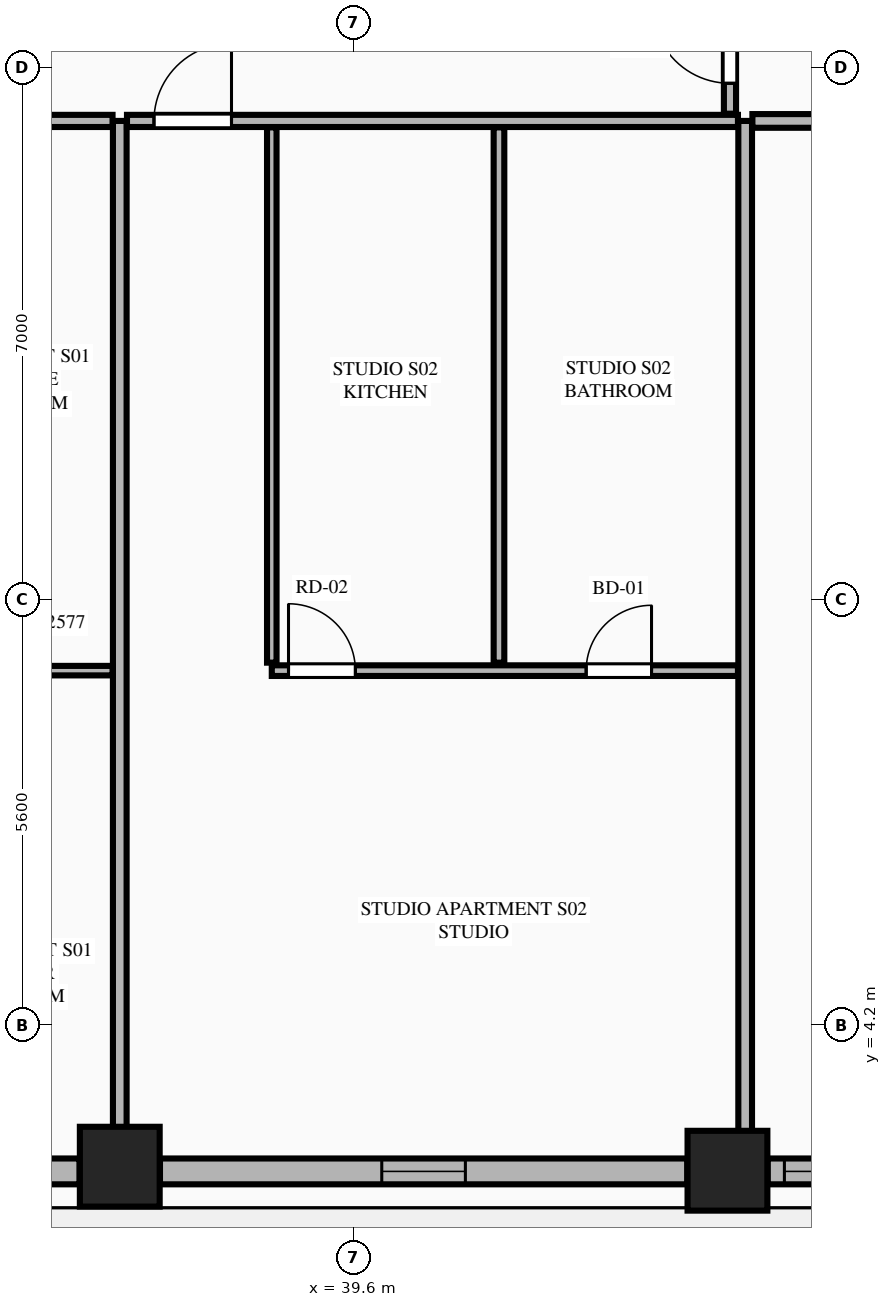
"""IFC4 building model, lengths in metres.
Left out: names, types, materials, properties, quantities, classifications, styles, units other than length and angle.
Written with IfcOpenShell. Run it as: python <this file> out.ifc"""

import sys

from ifc_helpers import new_model, si_unit, direction, frame, frame_2d, origin, origin_2d, place, context, subcontext, project, spatial, rectangle, extrude, element, fill, save


model = new_model("IFC4")
c1 = context("Model", 3, precision=1e-05, world=origin(), true_north=direction((0.0, 1.0)))
c2 = subcontext(c1, "Body", "Model", "MODEL_VIEW")
j1 = project(units=[si_unit("LENGTHUNIT", "METRE"), si_unit("PLANEANGLEUNIT", "RADIAN")], contexts=[c1])
p1 = place(None, origin())
s1 = spatial("IfcSite", under=j1, at=p1, CompositionType="ELEMENT")
p2 = place(p1, origin())
s2 = spatial("IfcBuilding", under=s1, at=p2, CompositionType="ELEMENT")
p3 = place(p2, frame((0.0, 0.0, 87.1)))
s3 = spatial("IfcBuildingStorey", under=s2, at=p3, CompositionType="ELEMENT", Elevation=87.1)
for number, where, z_axis, x_axis in (
    (1, (36.522, 2.342, 0.0), (0.0, 0.0, 1.0), (1.0, 0.0, 0.0)),
    (2, (44.517, 2.289, 0.0), (0.0, 0.0, 1.0), (1.0, 0.0, 0.0)),
):
    element("IfcColumn", number, at=place(p3, frame(where, z_axis=z_axis, x_axis=x_axis)), inside=s3, PredefinedType="COLUMN", context=c2, shape_type="SweptSolid", body=[
        extrude(rectangle(XDim=1.05, YDim=1.05, at=origin_2d()), origin(), (0.0, 0.0, 1.0), 3.55),
    ])
p4 = place(p3, frame((28.807, 2.28, 0.0), z_axis=(0.0, 0.0, 1.0), x_axis=(1.0, 0.0, 0.0)))
e3 = element("IfcWall", 3, at=p4, inside=s3, PredefinedType="STANDARD", context=c2, shape_type="SweptSolid", body=[
    extrude(rectangle(XDim=7.186, YDim=0.34, at=frame_2d((3.593, 0.0))), origin(), (0.0, 0.0, 1.0), 2.787),
])
p5 = place(p4, frame((1.92, 0.0, 0.0)))
e4 = element("IfcOpeningElement", 4, at=p5, cuts=e3, PredefinedType="OPENING", context=c2, shape_type="SweptSolid", body=[
    extrude(rectangle(XDim=1.1, YDim=2.25, at=frame_2d((0.55, 1.125))), frame((0.0, 0.18, 0.0), z_axis=(0.0, -1.0, 0.0), x_axis=(1.0, 0.0, 0.0)), (0.0, 0.0, 1.0), 0.36),
])
p6 = place(p4, frame((5.621, 0.0, 0.75)))
e5 = element("IfcOpeningElement", 5, at=p6, cuts=e3, PredefinedType="OPENING", context=c2, shape_type="SweptSolid", body=[
    extrude(rectangle(XDim=1.1, YDim=1.887, at=frame_2d((0.55, 0.943))), frame((0.0, 0.18, 0.0), z_axis=(0.0, -1.0, 0.0), x_axis=(1.0, 0.0, 0.0)), (0.0, 0.0, 1.0), 0.36),
])
p7 = place(p3, frame((37.051, 2.28, 0.0), z_axis=(0.0, 0.0, 1.0), x_axis=(1.0, 0.0, 0.0)))
e6 = element("IfcWall", 6, at=p7, inside=s3, PredefinedType="STANDARD", context=c2, shape_type="SweptSolid", body=[
    extrude(rectangle(XDim=6.937, YDim=0.34, at=frame_2d((3.469, 0.0))), origin(), (0.0, 0.0, 1.0), 2.787),
])
p8 = place(p7, frame((2.918, 0.0, 0.75)))
e7 = element("IfcOpeningElement", 7, at=p8, cuts=e6, PredefinedType="OPENING", context=c2, shape_type="SweptSolid", body=[
    extrude(rectangle(XDim=1.1, YDim=1.887, at=frame_2d((0.55, 0.943))), frame((0.0, 0.18, 0.0), z_axis=(0.0, -1.0, 0.0), x_axis=(1.0, 0.0, 0.0)), (0.0, 0.0, 1.0), 0.36),
])
p9 = place(p3, frame((45.046, 2.28, 0.0), z_axis=(0.0, 0.0, 1.0), x_axis=(1.0, 0.0, 0.0)))
e8 = element("IfcWall", 8, at=p9, inside=s3, PredefinedType="STANDARD", context=c2, shape_type="SweptSolid", body=[
    extrude(rectangle(XDim=1.32, YDim=0.34, at=frame_2d((0.66, 0.0))), origin(), (0.0, 0.0, 1.0), 3.33),
])
p10 = place(p9, frame((0.22, 0.0, 0.75)))
e9 = element("IfcOpeningElement", 9, at=p10, cuts=e8, PredefinedType="OPENING", context=c2, shape_type="SweptSolid", body=[
    extrude(rectangle(XDim=0.88, YDim=2.0, at=frame_2d((0.44, 1.0))), frame((0.0, 0.18, 0.0), z_axis=(0.0, -1.0, 0.0), x_axis=(1.0, 0.0, 0.0)), (0.0, 0.0, 1.0), 0.36),
])
p11 = place(p3, frame((36.522, 2.455, 0.0), z_axis=(0.0, 0.0, 1.0), x_axis=(0.0, 1.0, 0.0)))
e10 = element("IfcWall", 10, at=p11, inside=s3, PredefinedType="PARTITIONING", context=c2, shape_type="SweptSolid", body=[
    extrude(rectangle(XDim=13.645, YDim=0.18, at=frame_2d((6.823, 0.0))), origin(), (0.0, 0.0, 1.0), 2.7),
])
p12 = place(p3, frame((44.75, 2.455, 0.0), z_axis=(0.0, 0.0, 1.0), x_axis=(0.0, 1.0, 0.0)))
e11 = element("IfcWall", 11, at=p12, inside=s3, PredefinedType="PARTITIONING", context=c2, shape_type="SweptSolid", body=[
    extrude(rectangle(XDim=13.645, YDim=0.18, at=frame_2d((6.823, 0.0))), origin(), (0.0, 0.0, 1.0), 3.33),
])
p13 = place(p3, frame((20.145, 16.1, 0.0), z_axis=(0.0, 0.0, 1.0), x_axis=(1.0, 0.0, 0.0)))
e12 = element("IfcWall", 12, at=p13, inside=s3, PredefinedType="PARTITIONING", context=c2, shape_type="SweptSolid", body=[
    extrude(rectangle(XDim=16.282, YDim=0.16, at=frame_2d((8.141, 0.0))), origin(), (0.0, 0.0, 1.0), 3.33),
])
p14 = place(p13, frame((0.705, 0.0, 0.0)))
e13 = element("IfcOpeningElement", 13, at=p14, cuts=e12, PredefinedType="OPENING", context=c2, shape_type="SweptSolid", body=[
    extrude(rectangle(XDim=1.35, YDim=2.35, at=frame_2d((0.675, 1.175))), frame((0.0, 0.09, 0.0), z_axis=(0.0, -1.0, 0.0), x_axis=(1.0, 0.0, 0.0)), (0.0, 0.0, 1.0), 0.18),
])
p15 = place(p3, frame((33.85, 8.868, 0.0), z_axis=(0.0, 0.0, 1.0), x_axis=(1.0, 0.0, 0.0)))
e14 = element("IfcWall", 14, at=p15, inside=s3, PredefinedType="PARTITIONING", context=c2, shape_type="SweptSolid", body=[
    extrude(rectangle(XDim=2.577, YDim=0.125, at=frame_2d((1.289, 0.0))), origin(), (0.0, 0.0, 1.0), 3.33),
])
p16 = place(p15, frame((0.863, 0.0, 0.0)))
e15 = element("IfcOpeningElement", 15, at=p16, cuts=e14, PredefinedType="OPENING", context=c2, shape_type="SweptSolid", body=[
    extrude(rectangle(XDim=0.86, YDim=2.1, at=frame_2d((0.43, 1.05))), frame((0.0, 0.073, 0.0), z_axis=(0.0, -1.0, 0.0), x_axis=(1.0, 0.0, 0.0)), (0.0, 0.0, 1.0), 0.145),
])
p17 = place(p3, frame((36.617, 16.1, 0.0), z_axis=(0.0, 0.0, 1.0), x_axis=(1.0, 0.0, 0.0)))
e16 = element("IfcWall", 16, at=p17, inside=s3, PredefinedType="PARTITIONING", context=c2, shape_type="SweptSolid", body=[
    extrude(rectangle(XDim=8.038, YDim=0.16, at=frame_2d((4.019, 0.0))), origin(), (0.0, 0.0, 1.0), 3.33),
])
p18 = place(p17, frame((0.355, 0.0, 0.0)))
e17 = element("IfcOpeningElement", 17, at=p18, cuts=e16, PredefinedType="OPENING", context=c2, shape_type="SweptSolid", body=[
    extrude(rectangle(XDim=1.02, YDim=2.25, at=frame_2d((0.51, 1.125))), frame((0.0, 0.09, 0.0), z_axis=(0.0, -1.0, 0.0), x_axis=(1.0, 0.0, 0.0)), (0.0, 0.0, 1.0), 0.18),
])
p19 = place(p3, frame((38.522, 8.973, 0.0), z_axis=(0.0, 0.0, 1.0), x_axis=(0.0, 1.0, 0.0)))
e18 = element("IfcWall", 18, at=p19, inside=s3, PredefinedType="PARTITIONING", context=c2, shape_type="SweptSolid", body=[
    extrude(rectangle(XDim=7.042, YDim=0.125, at=frame_2d((3.521, 0.0))), origin(), (0.0, 0.0, 1.0), 3.33),
])
p20 = place(p3, frame((38.522, 8.868, 0.0), z_axis=(0.0, 0.0, 1.0), x_axis=(1.0, 0.0, 0.0)))
e19 = element("IfcWall", 19, at=p20, inside=s3, PredefinedType="PLUMBINGWALL", context=c2, shape_type="SweptSolid", body=[
    extrude(rectangle(XDim=6.133, YDim=0.14, at=frame_2d((3.066, 0.0))), origin(), (0.0, 0.0, 1.0), 3.33),
])
p21 = place(p20, frame((4.136, 0.0, 0.0)))
e20 = element("IfcOpeningElement", 20, at=p21, cuts=e19, PredefinedType="OPENING", context=c2, shape_type="SweptSolid", body=[
    extrude(rectangle(XDim=0.86, YDim=2.1, at=frame_2d((0.43, 1.05))), frame((0.0, 0.08, 0.0), z_axis=(0.0, -1.0, 0.0), x_axis=(1.0, 0.0, 0.0)), (0.0, 0.0, 1.0), 0.16),
])
p22 = place(p20, frame((0.22, 0.0, 0.0)))
e21 = element("IfcOpeningElement", 21, at=p22, cuts=e19, PredefinedType="OPENING", context=c2, shape_type="SweptSolid", body=[
    extrude(rectangle(XDim=0.88, YDim=2.15, at=frame_2d((0.44, 1.075))), frame((0.0, 0.08, 0.0), z_axis=(0.0, -1.0, 0.0), x_axis=(1.0, 0.0, 0.0)), (0.0, 0.0, 1.0), 0.16),
])
p23 = place(p3, frame((41.511, 8.973, 0.0), z_axis=(0.0, 0.0, 1.0), x_axis=(0.0, 1.0, 0.0)))
e22 = element("IfcWall", 22, at=p23, inside=s3, PredefinedType="PLUMBINGWALL", context=c2, shape_type="SweptSolid", body=[
    extrude(rectangle(XDim=7.042, YDim=0.14, at=frame_2d((3.521, 0.0))), origin(), (0.0, 0.0, 1.0), 3.33),
])
p24 = place(p3, frame((44.845, 16.1, 0.0), z_axis=(0.0, 0.0, 1.0), x_axis=(1.0, 0.0, 0.0)))
e23 = element("IfcWall", 23, at=p24, inside=s3, PredefinedType="PARTITIONING", context=c2, shape_type="SweptSolid", body=[
    extrude(rectangle(XDim=9.467, YDim=0.18, at=frame_2d((4.733, 0.0))), origin(), (0.0, 0.0, 1.0), 3.33),
])
p25 = place(p3, frame((44.55, 16.195, 0.0), z_axis=(0.0, 0.0, 1.0), x_axis=(0.0, 1.0, 0.0)))
e24 = element("IfcWall", 24, at=p25, inside=s3, PredefinedType="PARTITIONING", context=c2, shape_type="SweptSolid", body=[
    extrude(rectangle(XDim=19.41, YDim=0.16, at=frame_2d((9.705, 0.0))), origin(), (0.0, 0.0, 1.0), 2.7),
])
p26 = place(p25, frame((0.4, 0.0, 0.0)))
e25 = element("IfcOpeningElement", 25, at=p26, cuts=e24, PredefinedType="OPENING", context=c2, shape_type="SweptSolid", body=[
    extrude(rectangle(XDim=1.02, YDim=2.25, at=frame_2d((0.51, 1.125))), frame((0.0, 0.09, 0.0), z_axis=(0.0, -1.0, 0.0), x_axis=(1.0, 0.0, 0.0)), (0.0, 0.0, 1.0), 0.18),
])
p27 = place(p8, origin())
e26 = element("IfcWindow", 26, at=p27, inside=s3, PartitioningType="SINGLE_PANEL", PredefinedType="WINDOW", context=c2, shape_type="SweptSolid", body=[
    extrude(rectangle(XDim=1.1, YDim=1.887, at=frame_2d((0.55, 0.943))), frame((0.0, 0.03, 0.0), z_axis=(0.0, -1.0, 0.0), x_axis=(1.0, 0.0, 0.0)), (0.0, 0.0, 1.0), 0.06),
])
fill(e7, e26)
p28 = place(p21, origin())
e27 = element("IfcDoor", 27, at=p28, inside=s3, OperationType="SINGLE_SWING_RIGHT", PredefinedType="DOOR", context=c2, shape_type="SweptSolid", body=[
    extrude(rectangle(XDim=0.86, YDim=2.1, at=frame_2d((0.43, 1.05))), frame((0.0, 0.025, 0.0), z_axis=(0.0, -1.0, 0.0), x_axis=(1.0, 0.0, 0.0)), (0.0, 0.0, 1.0), 0.05),
])
fill(e20, e27)
p29 = place(p18, origin())
e28 = element("IfcDoor", 28, at=p29, inside=s3, OperationType="SINGLE_SWING_RIGHT", PredefinedType="DOOR", context=c2, shape_type="SweptSolid", body=[
    extrude(rectangle(XDim=1.02, YDim=2.25, at=frame_2d((0.51, 1.125))), frame((0.0, 0.025, 0.0), z_axis=(0.0, -1.0, 0.0), x_axis=(1.0, 0.0, 0.0)), (0.0, 0.0, 1.0), 0.05),
])
fill(e17, e28)
p30 = place(p22, origin())
e29 = element("IfcDoor", 29, at=p30, inside=s3, OperationType="SINGLE_SWING_LEFT", PredefinedType="DOOR", context=c2, shape_type="SweptSolid", body=[
    extrude(rectangle(XDim=0.88, YDim=2.15, at=frame_2d((0.44, 1.075))), frame((0.0, 0.025, 0.0), z_axis=(0.0, -1.0, 0.0), x_axis=(1.0, 0.0, 0.0)), (0.0, 0.0, 1.0), 0.05),
])
fill(e21, e29)
p31 = place(p26, origin())
e30 = element("IfcDoor", 30, at=p31, inside=s3, OperationType="SINGLE_SWING_RIGHT", PredefinedType="DOOR", context=c2, shape_type="SweptSolid", body=[
    extrude(rectangle(XDim=1.02, YDim=2.25, at=frame_2d((0.51, 1.125))), frame((0.0, 0.025, 0.0), z_axis=(0.0, -1.0, 0.0), x_axis=(1.0, 0.0, 0.0)), (0.0, 0.0, 1.0), 0.05),
])
fill(e25, e30)
p32 = place(p10, origin())
e31 = element("IfcWindow", 31, at=p32, inside=s3, PartitioningType="SINGLE_PANEL", PredefinedType="WINDOW", context=c2, shape_type="SweptSolid", body=[
    extrude(rectangle(XDim=0.88, YDim=2.0, at=frame_2d((0.44, 1.0))), frame((0.0, 0.03, 0.0), z_axis=(0.0, -1.0, 0.0), x_axis=(1.0, 0.0, 0.0)), (0.0, 0.0, 1.0), 0.06),
])
fill(e9, e31)
save(model, sys.argv[1])
